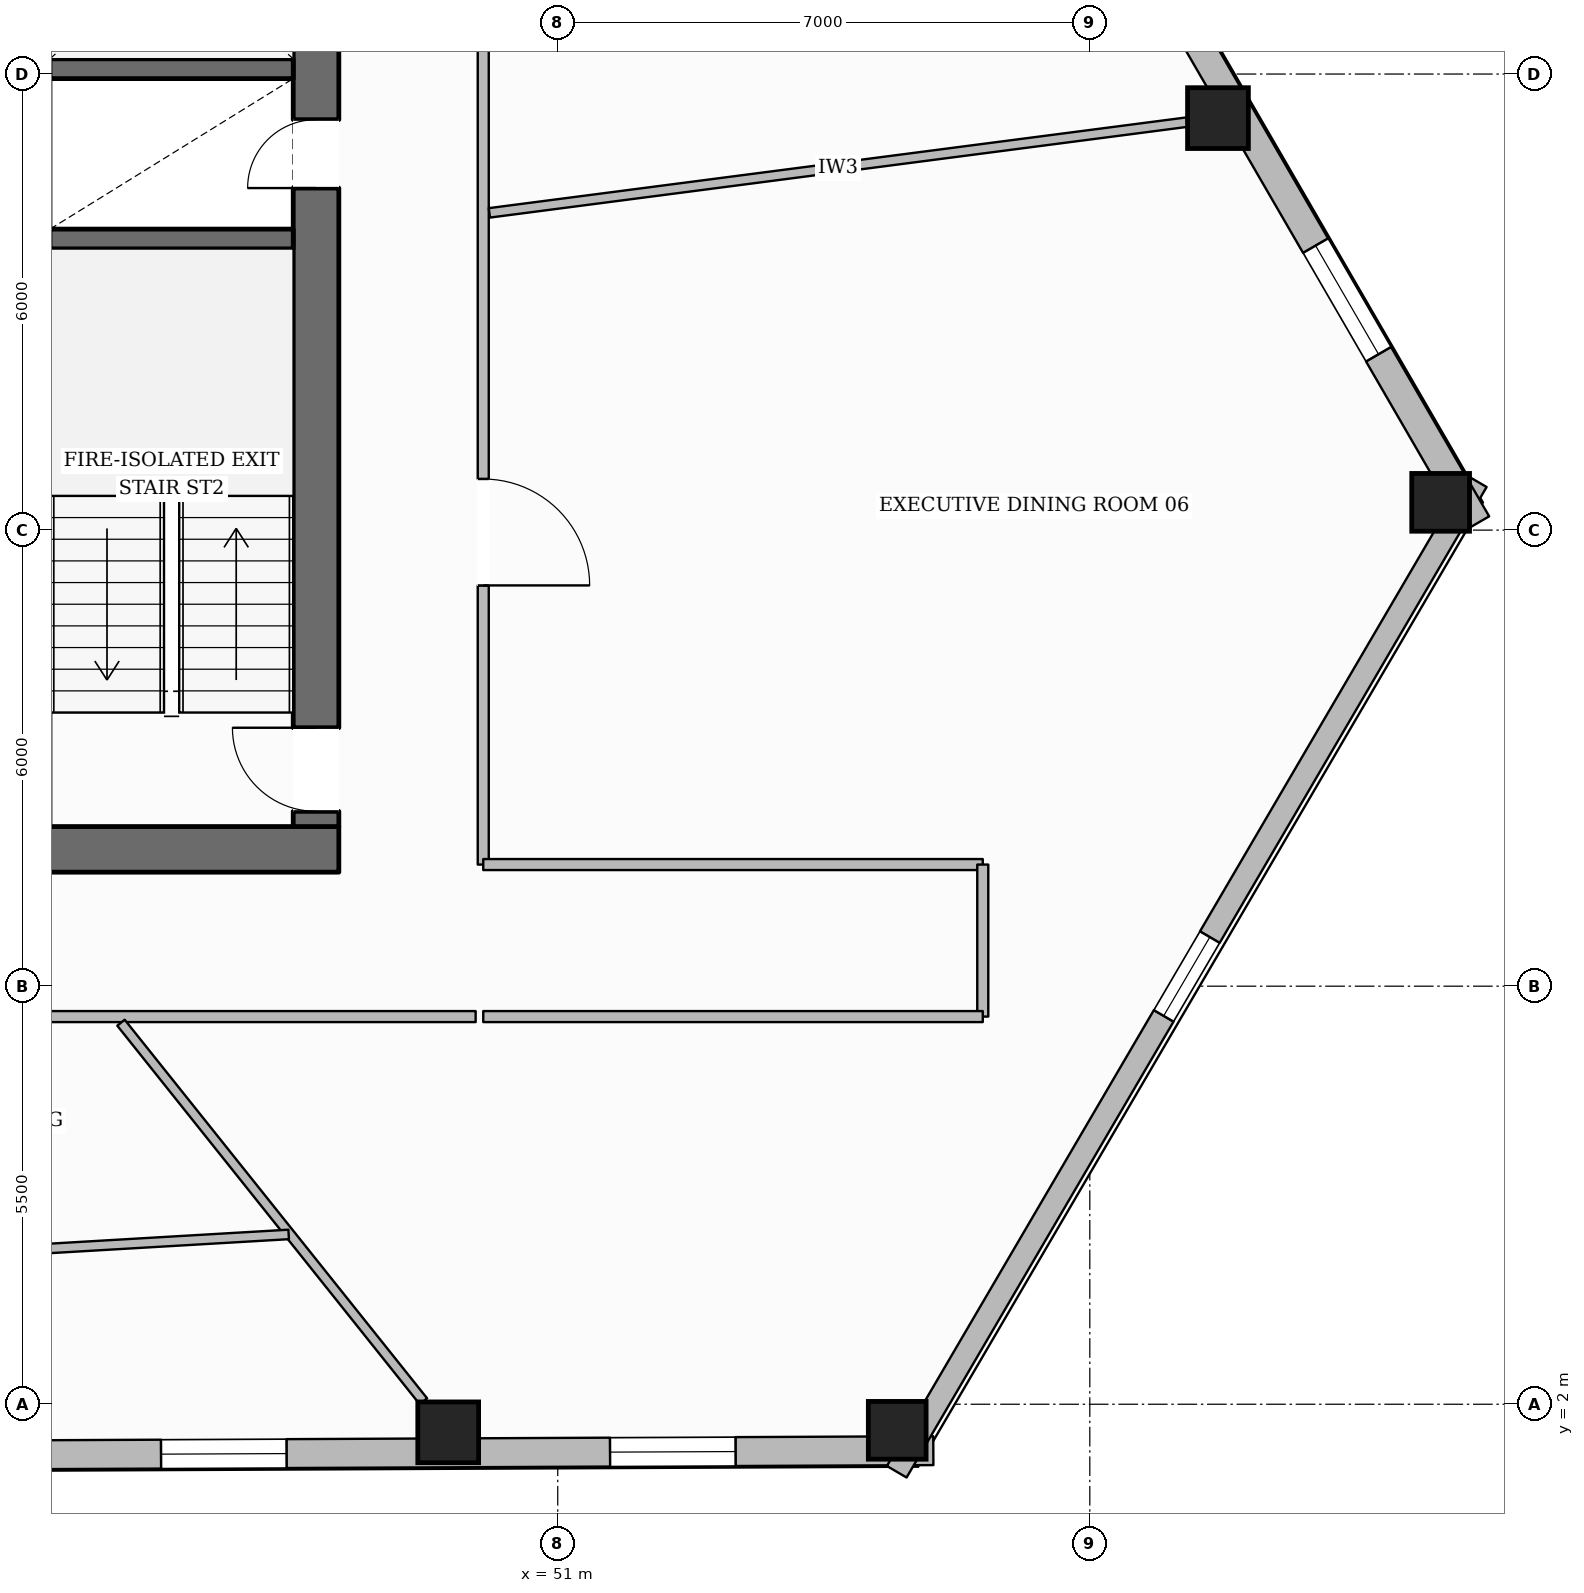
"""IFC4 building model, lengths in metres.
Left out: names, types, materials, properties, quantities, classifications, styles, units other than length and angle.
Written with IfcOpenShell. Run it as: python <this file> out.ifc"""

import sys

from ifc_helpers import new_model, si_unit, direction, frame, frame_2d, origin, origin_2d, place, context, subcontext, project, spatial, rectangle, hollow_rectangle, extrude, element, fill, save


model = new_model("IFC4")
c1 = context("Model", 3, precision=1e-05, world=origin(), true_north=direction((0.0, 1.0)))
c2 = subcontext(c1, "Body", "Model", "MODEL_VIEW")
j1 = project(units=[si_unit("LENGTHUNIT", "METRE"), si_unit("PLANEANGLEUNIT", "RADIAN")], contexts=[c1])
p1 = place(None, origin())
s1 = spatial("IfcSite", under=j1, at=p1, CompositionType="ELEMENT")
p2 = place(p1, origin())
s2 = spatial("IfcBuilding", under=s1, at=p2, CompositionType="ELEMENT")
p3 = place(p2, frame((0.0, 0.0, 67.6)))
s3 = spatial("IfcBuildingStorey", under=s2, at=p3, CompositionType="ELEMENT", Elevation=67.6)
p4 = place(p3, frame((27.88, 9.3, 0.0), z_axis=(0.0, 0.0, 1.0), x_axis=(1.0, 0.0, 0.0)))
e1 = element("IfcWall", 1, at=p4, inside=s3, PredefinedType="SOLIDWALL", context=c2, shape_type="SweptSolid", body=[
    extrude(rectangle(XDim=20.24, YDim=0.6, at=frame_2d((10.12, 0.0))), origin(), (0.0, 0.0, 1.0), 3.59),
])
p5 = place(p4, frame((10.62, 0.0, 0.0)))
e2 = element("IfcOpeningElement", 2, at=p5, cuts=e1, PredefinedType="OPENING", context=c2, shape_type="SweptSolid", body=[
    extrude(rectangle(XDim=1.4, YDim=2.2, at=frame_2d((0.7, 1.1))), frame((0.0, 0.31, 0.0), z_axis=(0.0, -1.0, 0.0), x_axis=(1.0, 0.0, 0.0)), (0.0, 0.0, 1.0), 0.62),
])
p6 = place(p3, frame((47.82, 9.6, 0.0), z_axis=(0.0, 0.0, 1.0), x_axis=(0.0, 1.0, 0.0)))
e3 = element("IfcWall", 3, at=p6, inside=s3, PredefinedType="SOLIDWALL", context=c2, shape_type="SweptSolid", body=[
    extrude(rectangle(XDim=13.0, YDim=0.6, at=frame_2d((6.5, 0.0))), origin(), (0.0, 0.0, 1.0), 3.59),
])
p7 = place(p6, frame((0.2, 0.0, 0.0)))
e4 = element("IfcOpeningElement", 4, at=p7, cuts=e3, PredefinedType="OPENING", context=c2, shape_type="SweptSolid", body=[
    extrude(rectangle(XDim=1.1, YDim=2.15, at=frame_2d((0.55, 1.075))), frame((0.0, 0.31, 0.0), z_axis=(0.0, -1.0, 0.0), x_axis=(1.0, 0.0, 0.0)), (0.0, 0.0, 1.0), 0.62),
])
p8 = place(p6, frame((8.4, 0.0, 0.0)))
e5 = element("IfcOpeningElement", 5, at=p8, cuts=e3, PredefinedType="OPENING", context=c2, shape_type="SweptSolid", body=[
    extrude(rectangle(XDim=0.9, YDim=2.1, at=frame_2d((0.45, 1.05))), frame((0.0, 0.31, 0.0), z_axis=(0.0, -1.0, 0.0), x_axis=(1.0, 0.0, 0.0)), (0.0, 0.0, 1.0), 0.62),
])
for number, where, z_axis, x_axis in (
    (6, (44.32, 17.33, 0.0), (0.0, 0.0, 1.0), (1.0, 0.0, 0.0)),
    (7, (44.32, 19.57, 0.0), (0.0, 0.0, 1.0), (1.0, 0.0, 0.0)),
):
    element("IfcWall", number, at=place(p3, frame(where, z_axis=z_axis, x_axis=x_axis)), inside=s3, PredefinedType="SHEAR", context=c2, shape_type="SweptSolid", body=[
        extrude(rectangle(XDim=3.2, YDim=0.26, at=frame_2d((1.6, 0.0))), origin(), (0.0, 0.0, 1.0), 3.59),
    ])
p9 = place(p3, frame((49.559, 1.631, 0.0), z_axis=(0.0, 0.0, 1.0), x_axis=(1.0, 0.0, 0.0)))
e8 = element("IfcColumn", 8, at=p9, inside=s3, PredefinedType="COLUMN", context=c2, shape_type="SweptSolid", body=[
    extrude(hollow_rectangle(XDim=0.8, YDim=0.8, WallThickness=0.036, at=origin_2d()), origin(), (0.0, 0.0, 1.0), 3.59),
])
for number, where, z_axis, x_axis in (
    (9, (55.466, 1.657, 0.0), (0.0, 0.0, 1.0), (1.0, 0.0, 0.0)),
    (10, (62.616, 13.865, 0.0), (0.0, 0.0, 1.0), (1.0, 0.0, 0.0)),
):
    element("IfcColumn", number, at=place(p3, frame(where, z_axis=z_axis, x_axis=x_axis)), inside=s3, PredefinedType="COLUMN", context=c2, shape_type="SweptSolid", body=[
        extrude(hollow_rectangle(XDim=0.76, YDim=0.76, WallThickness=0.035, at=origin_2d()), origin(), (0.0, 0.0, 1.0), 3.59),
    ])
p10 = place(p3, frame((59.686, 18.92, 0.0), z_axis=(0.0, 0.0, 1.0), x_axis=(1.0, 0.0, 0.0)))
e11 = element("IfcColumn", 11, at=p10, inside=s3, PredefinedType="COLUMN", context=c2, shape_type="SweptSolid", body=[
    extrude(hollow_rectangle(XDim=0.8, YDim=0.8, WallThickness=0.036, at=origin_2d()), origin(), (0.0, 0.0, 1.0), 3.59),
])
p11 = place(p3, frame((55.941, 1.389, 0.0), z_axis=(0.0, 0.0, 1.0), x_axis=(-0.999989840169, -0.004507722052, 0.0)))
e12 = element("IfcWall", 12, at=p11, inside=s3, PredefinedType="STANDARD", context=c2, shape_type="SweptSolid", body=[
    extrude(rectangle(XDim=36.396, YDim=0.38, at=frame_2d((18.198, 0.0))), origin(), (0.0, 0.0, 1.0), 2.97),
])
p12 = place(p11, frame((32.139, 0.0, 0.65)))
e13 = element("IfcOpeningElement", 13, at=p12, cuts=e12, PredefinedType="OPENING", context=c2, shape_type="SweptSolid", body=[
    extrude(rectangle(XDim=1.65, YDim=1.75, at=frame_2d((0.825, 0.875))), frame((0.0, 0.2, 0.0), z_axis=(0.0, -1.0, 0.0), x_axis=(1.0, 0.0, 0.0)), (0.0, 0.0, 1.0), 0.4),
])
p13 = place(p11, frame((26.232, 0.0, 0.65)))
e14 = element("IfcOpeningElement", 14, at=p13, cuts=e12, PredefinedType="OPENING", context=c2, shape_type="SweptSolid", body=[
    extrude(rectangle(XDim=1.65, YDim=1.75, at=frame_2d((0.825, 0.875))), frame((0.0, 0.2, 0.0), z_axis=(0.0, -1.0, 0.0), x_axis=(1.0, 0.0, 0.0)), (0.0, 0.0, 1.0), 0.4),
])
p14 = place(p11, frame((14.417, 0.0, 0.65)))
e15 = element("IfcOpeningElement", 15, at=p14, cuts=e12, PredefinedType="OPENING", context=c2, shape_type="SweptSolid", body=[
    extrude(rectangle(XDim=1.65, YDim=1.75, at=frame_2d((0.825, 0.875))), frame((0.0, 0.2, 0.0), z_axis=(0.0, -1.0, 0.0), x_axis=(1.0, 0.0, 0.0)), (0.0, 0.0, 1.0), 0.4),
])
p15 = place(p11, frame((8.51, 0.0, 0.65)))
e16 = element("IfcOpeningElement", 16, at=p15, cuts=e12, PredefinedType="OPENING", context=c2, shape_type="SweptSolid", body=[
    extrude(rectangle(XDim=1.65, YDim=1.75, at=frame_2d((0.825, 0.875))), frame((0.0, 0.2, 0.0), z_axis=(0.0, -1.0, 0.0), x_axis=(1.0, 0.0, 0.0)), (0.0, 0.0, 1.0), 0.4),
])
p16 = place(p11, frame((2.603, 0.0, 0.65)))
e17 = element("IfcOpeningElement", 17, at=p16, cuts=e12, PredefinedType="OPENING", context=c2, shape_type="SweptSolid", body=[
    extrude(rectangle(XDim=1.65, YDim=1.75, at=frame_2d((0.825, 0.875))), frame((0.0, 0.2, 0.0), z_axis=(0.0, -1.0, 0.0), x_axis=(1.0, 0.0, 0.0)), (0.0, 0.0, 1.0), 0.4),
])
p17 = place(p3, frame((63.091, 14.143, 0.0), z_axis=(0.0, 0.0, 1.0), x_axis=(-0.505336903524, -0.86292213666, 0.0)))
e18 = element("IfcWall", 18, at=p17, inside=s3, PredefinedType="STANDARD", context=c2, shape_type="SweptSolid", body=[
    extrude(rectangle(XDim=15.101, YDim=0.3, at=frame_2d((7.551, 0.0))), origin(), (0.0, 0.0, 1.0), 2.97),
])
p18 = place(p17, frame((6.951, 0.0, 0.65)))
e19 = element("IfcOpeningElement", 19, at=p18, cuts=e18, PredefinedType="OPENING", context=c2, shape_type="SweptSolid", body=[
    extrude(rectangle(XDim=1.2, YDim=1.7, at=frame_2d((0.6, 0.85))), frame((0.0, 0.16, 0.0), z_axis=(0.0, -1.0, 0.0), x_axis=(1.0, 0.0, 0.0)), (0.0, 0.0, 1.0), 0.32),
])
p19 = place(p3, frame((45.032, 44.743, 0.0), z_axis=(0.0, 0.0, 1.0), x_axis=(0.501444024373, -0.865190089183, 0.0)))
e20 = element("IfcWall", 20, at=p19, inside=s3, PredefinedType="STANDARD", context=c2, shape_type="SweptSolid", body=[
    extrude(rectangle(XDim=36.012, YDim=0.38, at=frame_2d((18.006, 0.0))), origin(), (0.0, 0.0, 1.0), 2.97),
])
p20 = place(p19, frame((31.786, 0.0, 0.65)))
e21 = element("IfcOpeningElement", 21, at=p20, cuts=e20, PredefinedType="OPENING", context=c2, shape_type="SweptSolid", body=[
    extrude(rectangle(XDim=1.65, YDim=1.75, at=frame_2d((0.825, 0.875))), frame((0.0, 0.2, 0.0), z_axis=(0.0, -1.0, 0.0), x_axis=(1.0, 0.0, 0.0)), (0.0, 0.0, 1.0), 0.4),
])
p21 = place(p19, frame((25.944, 0.0, 0.65)))
e22 = element("IfcOpeningElement", 22, at=p21, cuts=e20, PredefinedType="OPENING", context=c2, shape_type="SweptSolid", body=[
    extrude(rectangle(XDim=1.65, YDim=1.75, at=frame_2d((0.825, 0.875))), frame((0.0, 0.2, 0.0), z_axis=(0.0, -1.0, 0.0), x_axis=(1.0, 0.0, 0.0)), (0.0, 0.0, 1.0), 0.4),
])
p22 = place(p19, frame((14.259, 0.0, 0.65)))
e23 = element("IfcOpeningElement", 23, at=p22, cuts=e20, PredefinedType="OPENING", context=c2, shape_type="SweptSolid", body=[
    extrude(rectangle(XDim=1.65, YDim=1.75, at=frame_2d((0.825, 0.875))), frame((0.0, 0.2, 0.0), z_axis=(0.0, -1.0, 0.0), x_axis=(1.0, 0.0, 0.0)), (0.0, 0.0, 1.0), 0.4),
])
p23 = place(p19, frame((8.417, 0.0, 0.65)))
e24 = element("IfcOpeningElement", 24, at=p23, cuts=e20, PredefinedType="OPENING", context=c2, shape_type="SweptSolid", body=[
    extrude(rectangle(XDim=1.65, YDim=1.75, at=frame_2d((0.825, 0.875))), frame((0.0, 0.2, 0.0), z_axis=(0.0, -1.0, 0.0), x_axis=(1.0, 0.0, 0.0)), (0.0, 0.0, 1.0), 0.4),
])
p24 = place(p19, frame((2.574, 0.0, 0.65)))
e25 = element("IfcOpeningElement", 25, at=p24, cuts=e20, PredefinedType="OPENING", context=c2, shape_type="SweptSolid", body=[
    extrude(rectangle(XDim=1.65, YDim=1.75, at=frame_2d((0.825, 0.875))), frame((0.0, 0.2, 0.0), z_axis=(0.0, -1.0, 0.0), x_axis=(1.0, 0.0, 0.0)), (0.0, 0.0, 1.0), 0.4),
])
p25 = place(p3, frame((50.02, 25.1, 0.0), z_axis=(0.0, 0.0, 1.0), x_axis=(0.0, -1.0, 0.0)))
e26 = element("IfcWall", 26, at=p25, inside=s3, PredefinedType="PARTITIONING", context=c2, shape_type="SweptSolid", body=[
    extrude(rectangle(XDim=16.0, YDim=0.145, at=frame_2d((8.0, 0.0))), origin(), (0.0, 0.0, 1.0), 3.278),
])
p26 = place(p25, frame((3.098, 0.0, 0.0)))
e27 = element("IfcOpeningElement", 27, at=p26, cuts=e26, PredefinedType="OPENING", context=c2, shape_type="SweptSolid", body=[
    extrude(rectangle(XDim=1.4, YDim=2.2, at=frame_2d((0.7, 1.1))), frame((0.0, 0.083, 0.0), z_axis=(0.0, -1.0, 0.0), x_axis=(1.0, 0.0, 0.0)), (0.0, 0.0, 1.0), 0.165),
])
p27 = place(p25, frame((10.927, 0.0, 0.0)))
e28 = element("IfcOpeningElement", 28, at=p27, cuts=e26, PredefinedType="OPENING", context=c2, shape_type="SweptSolid", body=[
    extrude(rectangle(XDim=1.4, YDim=2.2, at=frame_2d((0.7, 1.1))), frame((0.0, 0.083, 0.0), z_axis=(0.0, -1.0, 0.0), x_axis=(1.0, 0.0, 0.0)), (0.0, 0.0, 1.0), 0.165),
])
p28 = place(p3, frame((50.02, 9.1, 0.0), z_axis=(0.0, 0.0, 1.0), x_axis=(1.0, 0.0, 0.0)))
e29 = element("IfcWall", 29, at=p28, inside=s3, PredefinedType="PARTITIONING", context=c2, shape_type="SweptSolid", body=[
    extrude(rectangle(XDim=6.572, YDim=0.145, at=frame_2d((3.286, 0.0))), origin(), (0.0, 0.0, 1.0), 3.59),
])
p29 = place(p3, frame((56.592, 9.1, 0.0), z_axis=(0.0, 0.0, 1.0), x_axis=(0.0, -1.0, 0.0)))
e30 = element("IfcWall", 30, at=p29, inside=s3, PredefinedType="PARTITIONING", context=c2, shape_type="SweptSolid", body=[
    extrude(rectangle(XDim=2.0, YDim=0.145, at=frame_2d((1.0, 0.0))), origin(), (0.0, 0.0, 1.0), 3.59),
])
p30 = place(p3, frame((56.592, 7.1, 0.0), z_axis=(0.0, 0.0, 1.0), x_axis=(-1.0, 0.0, 0.0)))
e31 = element("IfcWall", 31, at=p30, inside=s3, PredefinedType="PARTITIONING", context=c2, shape_type="SweptSolid", body=[
    extrude(rectangle(XDim=6.572, YDim=0.145, at=frame_2d((3.286, 0.0))), origin(), (0.0, 0.0, 1.0), 3.59),
])
p31 = place(p3, frame((49.92, 7.1, 0.0), z_axis=(0.0, 0.0, 1.0), x_axis=(-1.0, 0.0, 0.0)))
e32 = element("IfcWall", 32, at=p31, inside=s3, PredefinedType="PARTITIONING", context=c2, shape_type="SweptSolid", body=[
    extrude(rectangle(XDim=23.84, YDim=0.145, at=frame_2d((11.92, 0.0))), origin(), (0.0, 0.0, 1.0), 3.278),
])
p32 = place(p31, frame((18.48, 0.0, 0.0)))
e33 = element("IfcOpeningElement", 33, at=p32, cuts=e32, PredefinedType="OPENING", context=c2, shape_type="SweptSolid", body=[
    extrude(rectangle(XDim=0.88, YDim=2.1, at=frame_2d((0.44, 1.05))), frame((0.0, 0.083, 0.0), z_axis=(0.0, -1.0, 0.0), x_axis=(1.0, 0.0, 0.0)), (0.0, 0.0, 1.0), 0.165),
])
p33 = place(p31, frame((15.96, 0.0, 0.0)))
e34 = element("IfcOpeningElement", 34, at=p33, cuts=e32, PredefinedType="OPENING", context=c2, shape_type="SweptSolid", body=[
    extrude(rectangle(XDim=0.88, YDim=2.1, at=frame_2d((0.44, 1.05))), frame((0.0, 0.083, 0.0), z_axis=(0.0, -1.0, 0.0), x_axis=(1.0, 0.0, 0.0)), (0.0, 0.0, 1.0), 0.165),
])
p34 = place(p31, frame((13.5, 0.0, 0.0)))
e35 = element("IfcOpeningElement", 35, at=p34, cuts=e32, PredefinedType="OPENING", context=c2, shape_type="SweptSolid", body=[
    extrude(rectangle(XDim=0.96, YDim=2.1, at=frame_2d((0.48, 1.05))), frame((0.0, 0.083, 0.0), z_axis=(0.0, -1.0, 0.0), x_axis=(1.0, 0.0, 0.0)), (0.0, 0.0, 1.0), 0.165),
])
p35 = place(p31, frame((8.293, 0.0, 0.0)))
e36 = element("IfcOpeningElement", 36, at=p35, cuts=e32, PredefinedType="OPENING", context=c2, shape_type="SweptSolid", body=[
    extrude(rectangle(XDim=0.98, YDim=2.15, at=frame_2d((0.49, 1.075))), frame((0.0, 0.083, 0.0), z_axis=(0.0, -1.0, 0.0), x_axis=(1.0, 0.0, 0.0)), (0.0, 0.0, 1.0), 0.165),
])
p36 = place(p3, frame((50.101, 17.674, 0.0), z_axis=(0.0, 0.0, 1.0), x_axis=(0.991648297641, 0.128971523162, 0.0)))
e37 = element("IfcWall", 37, at=p36, inside=s3, PredefinedType="PARTITIONING", context=c2, shape_type="SweptSolid", body=[
    extrude(rectangle(XDim=9.255, YDim=0.125, at=frame_2d((4.627, 0.0))), origin(), (0.0, 0.0, 1.0), 3.057),
])
p37 = place(p3, frame((45.254, 7.02, 0.0), z_axis=(0.0, 0.0, 1.0), x_axis=(0.624167183672, -0.781290808103, 0.0)))
e38 = element("IfcWall", 38, at=p37, inside=s3, PredefinedType="PARTITIONING", context=c2, shape_type="SweptSolid", body=[
    extrude(rectangle(XDim=6.375, YDim=0.125, at=frame_2d((3.188, 0.0))), origin(), (0.0, 0.0, 1.0), 3.59),
])
p38 = place(p3, frame((27.212, 3.049, 0.0), z_axis=(0.0, 0.0, 1.0), x_axis=(0.998290936072, 0.058439772046, 0.0)))
e39 = element("IfcWall", 39, at=p38, inside=s3, PredefinedType="PARTITIONING", context=c2, shape_type="SweptSolid", body=[
    extrude(rectangle(XDim=20.282, YDim=0.125, at=frame_2d((10.141, 0.0))), origin(), (0.0, 0.0, 1.0), 3.278),
])
p39 = place(p38, frame((10.106, 0.0, 0.0)))
e40 = element("IfcOpeningElement", 40, at=p39, cuts=e39, PredefinedType="OPENING", context=c2, shape_type="SweptSolid", body=[
    extrude(rectangle(XDim=0.98, YDim=2.15, at=frame_2d((0.49, 1.075))), frame((0.0, 0.073, 0.0), z_axis=(0.0, -1.0, 0.0), x_axis=(1.0, 0.0, 0.0)), (0.0, 0.0, 1.0), 0.145),
])
p40 = place(p15, origin())
e41 = element("IfcWindow", 41, at=p40, inside=s3, PartitioningType="SINGLE_PANEL", PredefinedType="WINDOW", context=c2, shape_type="SweptSolid", body=[
    extrude(rectangle(XDim=1.65, YDim=1.75, at=frame_2d((0.825, 0.875))), frame((0.0, 0.03, 0.0), z_axis=(0.0, -1.0, 0.0), x_axis=(1.0, 0.0, 0.0)), (0.0, 0.0, 1.0), 0.06),
])
fill(e16, e41)
p41 = place(p16, origin())
e42 = element("IfcWindow", 42, at=p41, inside=s3, PartitioningType="SINGLE_PANEL", PredefinedType="WINDOW", context=c2, shape_type="SweptSolid", body=[
    extrude(rectangle(XDim=1.65, YDim=1.75, at=frame_2d((0.825, 0.875))), frame((0.0, 0.03, 0.0), z_axis=(0.0, -1.0, 0.0), x_axis=(1.0, 0.0, 0.0)), (0.0, 0.0, 1.0), 0.06),
])
fill(e17, e42)
p42 = place(p20, origin())
e43 = element("IfcWindow", 43, at=p42, inside=s3, PartitioningType="SINGLE_PANEL", PredefinedType="WINDOW", context=c2, shape_type="SweptSolid", body=[
    extrude(rectangle(XDim=1.65, YDim=1.75, at=frame_2d((0.825, 0.875))), frame((0.0, 0.03, 0.0), z_axis=(0.0, -1.0, 0.0), x_axis=(1.0, 0.0, 0.0)), (0.0, 0.0, 1.0), 0.06),
])
fill(e21, e43)
p43 = place(p18, origin())
e44 = element("IfcWindow", 44, at=p43, inside=s3, PartitioningType="SINGLE_PANEL", PredefinedType="WINDOW", context=c2, shape_type="SweptSolid", body=[
    extrude(rectangle(XDim=1.2, YDim=1.7, at=frame_2d((0.6, 0.85))), frame((0.0, 0.03, 0.0), z_axis=(0.0, -1.0, 0.0), x_axis=(1.0, 0.0, 0.0)), (0.0, 0.0, 1.0), 0.06),
])
fill(e19, e44)
p44 = place(p7, origin())
e45 = element("IfcDoor", 45, at=p44, inside=s3, OperationType="SINGLE_SWING_RIGHT", PredefinedType="DOOR", context=c2, shape_type="SweptSolid", body=[
    extrude(rectangle(XDim=1.1, YDim=2.15, at=frame_2d((0.55, 1.075))), frame((0.0, 0.025, 0.0), z_axis=(0.0, -1.0, 0.0), x_axis=(1.0, 0.0, 0.0)), (0.0, 0.0, 1.0), 0.05),
])
fill(e4, e45)
p45 = place(p8, origin())
e46 = element("IfcDoor", 46, at=p45, inside=s3, OperationType="SINGLE_SWING_LEFT", PredefinedType="DOOR", context=c2, shape_type="SweptSolid", body=[
    extrude(rectangle(XDim=0.9, YDim=2.1, at=frame_2d((0.45, 1.05))), frame((0.0, 0.025, 0.0), z_axis=(0.0, -1.0, 0.0), x_axis=(1.0, 0.0, 0.0)), (0.0, 0.0, 1.0), 0.05),
])
fill(e5, e46)
p46 = place(p27, origin())
e47 = element("IfcDoor", 47, at=p46, inside=s3, OperationType="SINGLE_SWING_RIGHT", PredefinedType="DOOR", context=c2, shape_type="SweptSolid", body=[
    extrude(rectangle(XDim=1.4, YDim=2.2, at=frame_2d((0.7, 1.1))), frame((0.0, 0.025, 0.0), z_axis=(0.0, -1.0, 0.0), x_axis=(1.0, 0.0, 0.0)), (0.0, 0.0, 1.0), 0.05),
])
fill(e28, e47)
save(model, sys.argv[1])
